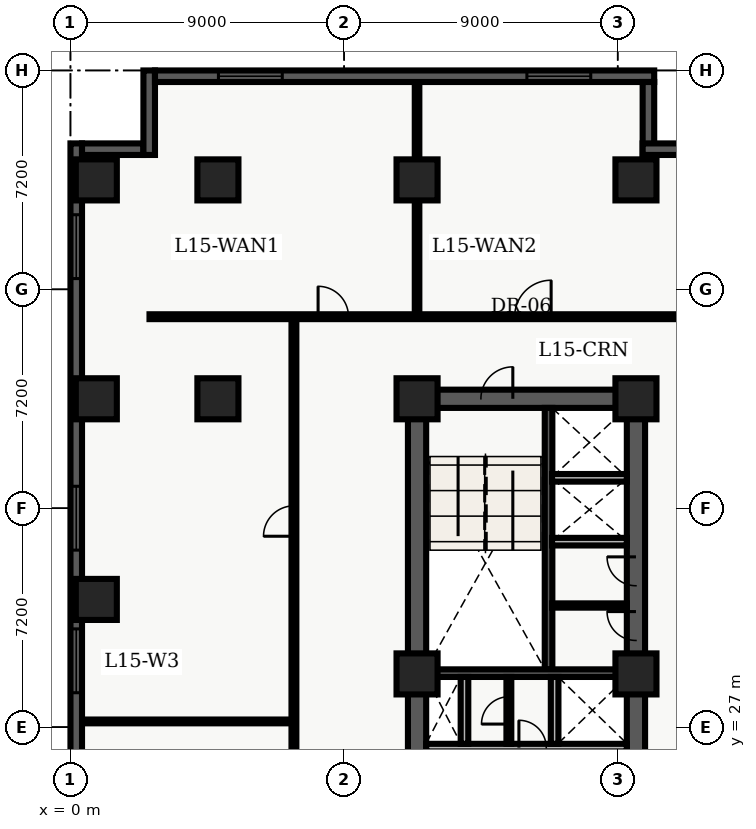
"""IFC4 building model, lengths in metres.
Left out: names, types, materials, properties, quantities, classifications, styles, units other than length and angle.
Written with IfcOpenShell. Run it as: python <this file> out.ifc"""

import sys

from ifc_helpers import new_model, entity, si_unit, converted_unit, direction, frame, origin_with_axes, origin_2d_with_axis, place, context, subcontext, project, spatial, polyline, rectangle, outline, extrude, element, fill, save


model = new_model("IFC4")
c1 = context("Model", 3, precision=1e-05, world=origin_with_axes(), true_north=direction((0.0, 1.0)))
c2 = subcontext(c1, "Body", "Model", "MODEL_VIEW")
j1 = project(units=[si_unit("LENGTHUNIT", "METRE"), converted_unit("PLANEANGLEUNIT", "DEGREE", entity("IfcPlaneAngleMeasure", 0.017), si_unit("PLANEANGLEUNIT", "RADIAN"), dimensions=[0, 0, 0, 0, 0, 0, 0])], contexts=[c1])
p1 = place(None, origin_with_axes())
s1 = spatial("IfcSite", under=j1, at=p1, CompositionType="ELEMENT")
p2 = place(p1, origin_with_axes())
s2 = spatial("IfcBuilding", under=s1, at=p2, CompositionType="ELEMENT")
p3 = place(p2, frame((0.0, 0.0, 63.9), z_axis=(0.0, 0.0, 1.0), x_axis=(1.0, 0.0, 0.0)))
s3 = spatial("IfcBuildingStorey", under=s2, at=p3, CompositionType="ELEMENT", Elevation=63.9)
p4 = place(p3, frame((11.4, 10.8, 0.0), z_axis=(0.0, 0.0, 1.0), x_axis=(0.0, 1.0, 0.0)))
e1 = element("IfcWall", 1, at=p4, inside=s3, PredefinedType="SHEAR", context=c2, shape_type="SweptSolid", body=[
    extrude(outline(polyline([(0.0, -0.3), (27.0, -0.3), (27.0, 0.3), (0.0, 0.3), (0.0, -0.3)])), origin_with_axes(), (0.0, 0.0, 1.0), 3.66),
])
p5 = place(p3, frame((11.4, 37.8, 0.0), z_axis=(0.0, 0.0, 1.0), x_axis=(1.0, 0.0, 0.0)))
e2 = element("IfcWall", 2, at=p5, inside=s3, PredefinedType="SHEAR", context=c2, shape_type="SweptSolid", body=[
    extrude(outline(polyline([(0.0, -0.3), (7.2, -0.3), (7.2, 0.3), (0.0, 0.3), (0.0, -0.3)])), origin_with_axes(), (0.0, 0.0, 1.0), 3.66),
])
p6 = place(p5, frame((2.625, 0.0, 0.0), z_axis=(0.0, 0.0, 1.0), x_axis=(1.0, 0.0, 0.0)))
e3 = element("IfcOpeningElement", 3, at=p6, cuts=e2, PredefinedType="OPENING", context=c2, shape_type="SweptSolid", body=[
    extrude(rectangle(XDim=1.05, YDim=0.62, at=origin_2d_with_axis()), origin_with_axes(), (0.0, 0.0, 1.0), 2.15),
])
p7 = place(p3, frame((18.6, 24.3, 0.0), z_axis=(0.0, 0.0, 1.0), x_axis=(0.0, 1.0, 0.0)))
e4 = element("IfcWall", 4, at=p7, inside=s3, PredefinedType="SHEAR", context=c2, shape_type="SweptSolid", body=[
    extrude(outline(polyline([(0.0, -0.3), (13.5, -0.3), (13.5, 0.3), (0.0, 0.3), (0.0, -0.3)])), origin_with_axes(), (0.0, 0.0, 1.0), 3.66),
])
p8 = place(p7, frame((6.025, 0.0, 0.0), z_axis=(0.0, 0.0, 1.0), x_axis=(1.0, 0.0, 0.0)))
e5 = element("IfcOpeningElement", 5, at=p8, cuts=e4, PredefinedType="OPENING", context=c2, shape_type="SweptSolid", body=[
    extrude(rectangle(XDim=0.95, YDim=0.62, at=origin_2d_with_axis()), origin_with_axes(), (0.0, 0.0, 1.0), 2.15),
])
p9 = place(p7, frame((7.825, 0.0, 0.0), z_axis=(0.0, 0.0, 1.0), x_axis=(1.0, 0.0, 0.0)))
e6 = element("IfcOpeningElement", 6, at=p9, cuts=e4, PredefinedType="OPENING", context=c2, shape_type="SweptSolid", body=[
    extrude(rectangle(XDim=0.95, YDim=0.62, at=origin_2d_with_axis()), origin_with_axes(), (0.0, 0.0, 1.0), 2.15),
])
p10 = place(p3, frame((15.725, 28.9, 0.0), z_axis=(0.0, 0.0, 1.0), x_axis=(0.0, 1.0, 0.0)))
e7 = element("IfcWall", 7, at=p10, inside=s3, PredefinedType="SHEAR", context=c2, shape_type="SweptSolid", body=[
    extrude(outline(polyline([(0.0, -0.125), (8.6, -0.125), (8.6, 0.125), (0.0, 0.125), (0.0, -0.125)])), origin_with_axes(), (0.0, 0.0, 1.0), 3.66),
])
p11 = place(p3, frame((11.7, 28.775, 0.0), z_axis=(0.0, 0.0, 1.0), x_axis=(1.0, 0.0, 0.0)))
e8 = element("IfcWall", 8, at=p11, inside=s3, PredefinedType="SHEAR", context=c2, shape_type="SweptSolid", body=[
    extrude(outline(polyline([(0.0, -0.125), (6.6, -0.125), (6.6, 0.125), (0.0, 0.125), (0.0, -0.125)])), origin_with_axes(), (0.0, 0.0, 1.0), 3.66),
])
p12 = place(p3, frame((11.7, 26.325, 0.0), z_axis=(0.0, 0.0, 1.0), x_axis=(1.0, 0.0, 0.0)))
e9 = element("IfcWall", 9, at=p12, inside=s3, PredefinedType="SOLIDWALL", context=c2, shape_type="SweptSolid", body=[
    extrude(outline(polyline([(0.0, -0.125), (6.6, -0.125), (6.6, 0.125), (0.0, 0.125), (0.0, -0.125)])), origin_with_axes(), (0.0, 0.0, 1.0), 2.7),
])
p13 = place(p12, frame((3.5, 0.0, 0.0), z_axis=(0.0, 0.0, 1.0), x_axis=(1.0, 0.0, 0.0)))
e10 = element("IfcOpeningElement", 10, at=p13, cuts=e9, PredefinedType="OPENING", context=c2, shape_type="SweptSolid", body=[
    extrude(rectangle(XDim=0.9, YDim=0.27, at=origin_2d_with_axis()), origin_with_axes(), (0.0, 0.0, 1.0), 2.15),
])
for number, where, z_axis, x_axis in (
    (11, (12.96, 26.45, 0.0), (0.0, 0.0, 1.0), (0.0, 1.0, 0.0)),
    (12, (15.925, 26.45, 0.0), (0.0, 0.0, 1.0), (0.0, 1.0, 0.0)),
):
    element("IfcWall", number, at=place(p3, frame(where, z_axis=z_axis, x_axis=x_axis)), inside=s3, PredefinedType="SOLIDWALL", context=c2, shape_type="SweptSolid", body=[
        extrude(outline(polyline([(0.0, -0.125), (2.2, -0.125), (2.2, 0.125), (0.0, 0.125), (0.0, -0.125)])), origin_with_axes(), (0.0, 0.0, 1.0), 2.7),
    ])
for number, where, z_axis, x_axis in (
    (13, (11.4, 28.75, 0.0), (0.0, 0.0, 1.0), (1.0, 0.0, 0.0)),
    (14, (11.4, 37.8, 0.0), (0.0, 0.0, 1.0), (1.0, 0.0, 0.0)),
    (15, (11.4, 45.0, 0.0), (0.0, 0.0, 1.0), (1.0, 0.0, 0.0)),
    (16, (18.6, 28.75, 0.0), (0.0, 0.0, 1.0), (1.0, 0.0, 0.0)),
    (17, (18.6, 37.8, 0.0), (0.0, 0.0, 1.0), (1.0, 0.0, 0.0)),
    (18, (18.6, 45.0, 0.0), (0.0, 0.0, 1.0), (1.0, 0.0, 0.0)),
    (19, (4.85, 37.8, 0.0), (0.0, 0.0, 1.0), (1.0, 0.0, 0.0)),
    (20, (4.85, 45.0, 0.0), (0.0, 0.0, 1.0), (1.0, 0.0, 0.0)),
    (21, (0.85, 31.2, 0.0), (0.0, 0.0, 1.0), (1.0, 0.0, 0.0)),
    (22, (0.85, 37.8, 0.0), (0.0, 0.0, 1.0), (1.0, 0.0, 0.0)),
    (23, (0.85, 45.0, 0.0), (0.0, 0.0, 1.0), (1.0, 0.0, 0.0)),
):
    element("IfcColumn", number, at=place(p3, frame(where, z_axis=z_axis, x_axis=x_axis)), inside=s3, PredefinedType="COLUMN", context=c2, shape_type="SweptSolid", body=[
        extrude(rectangle(XDim=1.35, YDim=1.35, at=origin_2d_with_axis()), origin_with_axes(), (0.0, 0.0, 1.0), 3.9),
    ])
p14 = place(p3, frame((14.42, 26.45, 0.0), z_axis=(0.0, 0.0, 1.0), x_axis=(0.0, 1.0, 0.0)))
e24 = element("IfcWall", 24, at=p14, inside=s3, PredefinedType="PARTITIONING", context=c2, shape_type="SweptSolid", body=[
    extrude(outline(polyline([(0.0, -0.08), (2.2, -0.08), (2.2, 0.08), (0.0, 0.08), (0.0, -0.08)])), origin_with_axes(), (0.0, 0.0, 1.0), 2.7),
])
p15 = place(p14, frame((1.1, 0.0, 0.0), z_axis=(0.0, 0.0, 1.0), x_axis=(1.0, 0.0, 0.0)))
e25 = element("IfcOpeningElement", 25, at=p15, cuts=e24, PredefinedType="OPENING", context=c2, shape_type="SweptSolid", body=[
    extrude(rectangle(XDim=0.9, YDim=0.18, at=origin_2d_with_axis()), origin_with_axes(), (0.0, 0.0, 1.0), 2.15),
])
for number, where, z_axis, x_axis in (
    (26, (15.84, 33.1, 0.0), (0.0, 0.0, 1.0), (1.0, 0.0, 0.0)),
    (27, (15.84, 35.2, 0.0), (0.0, 0.0, 1.0), (1.0, 0.0, 0.0)),
):
    element("IfcWall", number, at=place(p3, frame(where, z_axis=z_axis, x_axis=x_axis)), inside=s3, PredefinedType="SOLIDWALL", context=c2, shape_type="SweptSolid", body=[
        extrude(outline(polyline([(0.0, -0.125), (2.46, -0.125), (2.46, 0.125), (0.0, 0.125), (0.0, -0.125)])), origin_with_axes(), (0.0, 0.0, 1.0), 2.7),
    ])
p16 = place(p3, frame((15.84, 31.0, 0.0), z_axis=(0.0, 0.0, 1.0), x_axis=(1.0, 0.0, 0.0)))
e28 = element("IfcWall", 28, at=p16, inside=s3, PredefinedType="PARTITIONING", context=c2, shape_type="SweptSolid", body=[
    extrude(outline(polyline([(0.0, -0.07), (2.46, -0.07), (2.46, 0.07), (0.0, 0.07), (0.0, -0.07)])), origin_with_axes(), (0.0, 0.0, 1.0), 2.7),
])
p17 = place(p3, frame((2.6, 40.5, 0.0), z_axis=(0.0, 0.0, 1.0), x_axis=(1.0, 0.0, 0.0)))
e29 = element("IfcWall", 29, at=p17, inside=s3, PredefinedType="PARTITIONING", context=c2, shape_type="SweptSolid", body=[
    extrude(outline(polyline([(0.0, -0.08), (18.65, -0.08), (18.65, 0.08), (0.0, 0.08), (0.0, -0.08)])), origin_with_axes(), (0.0, 0.0, 1.0), 2.7),
])
p18 = place(p17, frame((6.045, 0.0, 0.0), z_axis=(0.0, 0.0, 1.0), x_axis=(1.0, 0.0, 0.0)))
e30 = element("IfcOpeningElement", 30, at=p18, cuts=e29, PredefinedType="OPENING", context=c2, shape_type="SweptSolid", body=[
    extrude(rectangle(XDim=1.0, YDim=0.18, at=origin_2d_with_axis()), origin_with_axes(), (0.0, 0.0, 1.0), 2.15),
])
p19 = place(p17, frame((12.61, 0.0, 0.0), z_axis=(0.0, 0.0, 1.0), x_axis=(1.0, 0.0, 0.0)))
e31 = element("IfcOpeningElement", 31, at=p19, cuts=e29, PredefinedType="OPENING", context=c2, shape_type="SweptSolid", body=[
    extrude(rectangle(XDim=1.2, YDim=0.18, at=origin_2d_with_axis()), origin_with_axes(), (0.0, 0.0, 1.0), 2.2),
])
p20 = place(p3, frame((7.35, 7.8, 0.0), z_axis=(0.0, 0.0, 1.0), x_axis=(0.0, 1.0, 0.0)))
e32 = element("IfcWall", 32, at=p20, inside=s3, PredefinedType="PARTITIONING", context=c2, shape_type="SweptSolid", body=[
    extrude(outline(polyline([(0.0, -0.08), (32.7, -0.08), (32.7, 0.08), (0.0, 0.08), (0.0, -0.08)])), origin_with_axes(), (0.0, 0.0, 1.0), 2.7),
])
p21 = place(p20, frame((4.379, 0.0, 0.0), z_axis=(0.0, 0.0, 1.0), x_axis=(1.0, 0.0, 0.0)))
e33 = element("IfcOpeningElement", 33, at=p21, cuts=e32, PredefinedType="OPENING", context=c2, shape_type="SweptSolid", body=[
    extrude(rectangle(XDim=1.0, YDim=0.18, at=origin_2d_with_axis()), origin_with_axes(), (0.0, 0.0, 1.0), 2.15),
])
p22 = place(p20, frame((14.008, 0.0, 0.0), z_axis=(0.0, 0.0, 1.0), x_axis=(1.0, 0.0, 0.0)))
e34 = element("IfcOpeningElement", 34, at=p22, cuts=e32, PredefinedType="OPENING", context=c2, shape_type="SweptSolid", body=[
    extrude(rectangle(XDim=1.0, YDim=0.18, at=origin_2d_with_axis()), origin_with_axes(), (0.0, 0.0, 1.0), 2.15),
])
p23 = place(p20, frame((25.979, 0.0, 0.0), z_axis=(0.0, 0.0, 1.0), x_axis=(1.0, 0.0, 0.0)))
e35 = element("IfcOpeningElement", 35, at=p23, cuts=e32, PredefinedType="OPENING", context=c2, shape_type="SweptSolid", body=[
    extrude(rectangle(XDim=1.0, YDim=0.18, at=origin_2d_with_axis()), origin_with_axes(), (0.0, 0.0, 1.0), 2.15),
])
p24 = place(p3, frame((0.375, 27.187, 0.0), z_axis=(0.0, 0.0, 1.0), x_axis=(1.0, 0.0, 0.0)))
e36 = element("IfcWall", 36, at=p24, inside=s3, PredefinedType="PARTITIONING", context=c2, shape_type="SweptSolid", body=[
    extrude(outline(polyline([(0.0, -0.062), (6.855, -0.062), (6.855, 0.062), (0.0, 0.062), (0.0, -0.062)])), origin_with_axes(), (0.0, 0.0, 1.0), 2.7),
])
p25 = place(p3, frame((11.4, 40.6, 0.0), z_axis=(0.0, 0.0, 1.0), x_axis=(0.0, 1.0, 0.0)))
e37 = element("IfcWall", 37, at=p25, inside=s3, PredefinedType="PARTITIONING", context=c2, shape_type="SweptSolid", body=[
    extrude(outline(polyline([(0.0, -0.075), (7.64, -0.075), (7.64, 0.075), (0.0, 0.075), (0.0, -0.075)])), origin_with_axes(), (0.0, 0.0, 1.0), 2.7),
])
p26 = place(p3, frame((0.19, 2.78, 0.0), z_axis=(0.0, 0.0, 1.0), x_axis=(0.0, 1.0, 0.0)))
e38 = element("IfcWall", 38, at=p26, inside=s3, PredefinedType="SOLIDWALL", context=c2, shape_type="SweptSolid", body=[
    extrude(outline(polyline([(0.0, -0.19), (43.42, -0.19), (43.42, 0.19), (0.0, 0.19), (0.0, -0.19)])), origin_with_axes(), (0.0, 0.0, 1.0), 3.66),
])
p27 = place(p26, frame((2.946, 0.0, 0.45), z_axis=(0.0, 0.0, 1.0), x_axis=(1.0, 0.0, 0.0)))
e39 = element("IfcOpeningElement", 39, at=p27, cuts=e38, PredefinedType="OPENING", context=c2, shape_type="SweptSolid", body=[
    extrude(rectangle(XDim=2.1, YDim=0.4, at=origin_2d_with_axis()), origin_with_axes(), (0.0, 0.0, 1.0), 2.2),
])
p28 = place(p26, frame((11.878, 0.0, 0.45), z_axis=(0.0, 0.0, 1.0), x_axis=(1.0, 0.0, 0.0)))
e40 = element("IfcOpeningElement", 40, at=p28, cuts=e38, PredefinedType="OPENING", context=c2, shape_type="SweptSolid", body=[
    extrude(rectangle(XDim=2.1, YDim=0.4, at=origin_2d_with_axis()), origin_with_axes(), (0.0, 0.0, 1.0), 2.2),
])
p29 = place(p26, frame((17.469, 0.0, 0.45), z_axis=(0.0, 0.0, 1.0), x_axis=(1.0, 0.0, 0.0)))
e41 = element("IfcOpeningElement", 41, at=p29, cuts=e38, PredefinedType="OPENING", context=c2, shape_type="SweptSolid", body=[
    extrude(rectangle(XDim=2.1, YDim=0.4, at=origin_2d_with_axis()), origin_with_axes(), (0.0, 0.0, 1.0), 2.2),
])
p30 = place(p26, frame((21.71, 0.0, 0.45), z_axis=(0.0, 0.0, 1.0), x_axis=(1.0, 0.0, 0.0)))
e42 = element("IfcOpeningElement", 42, at=p30, cuts=e38, PredefinedType="OPENING", context=c2, shape_type="SweptSolid", body=[
    extrude(rectangle(XDim=2.1, YDim=0.4, at=origin_2d_with_axis()), origin_with_axes(), (0.0, 0.0, 1.0), 2.2),
])
p31 = place(p26, frame((26.401, 0.0, 0.45), z_axis=(0.0, 0.0, 1.0), x_axis=(1.0, 0.0, 0.0)))
e43 = element("IfcOpeningElement", 43, at=p31, cuts=e38, PredefinedType="OPENING", context=c2, shape_type="SweptSolid", body=[
    extrude(rectangle(XDim=2.1, YDim=0.4, at=origin_2d_with_axis()), origin_with_axes(), (0.0, 0.0, 1.0), 2.2),
])
p32 = place(p26, frame((31.092, 0.0, 0.45), z_axis=(0.0, 0.0, 1.0), x_axis=(1.0, 0.0, 0.0)))
e44 = element("IfcOpeningElement", 44, at=p32, cuts=e38, PredefinedType="OPENING", context=c2, shape_type="SweptSolid", body=[
    extrude(rectangle(XDim=2.1, YDim=0.4, at=origin_2d_with_axis()), origin_with_axes(), (0.0, 0.0, 1.0), 2.2),
])
p33 = place(p26, frame((40.024, 0.0, 0.45), z_axis=(0.0, 0.0, 1.0), x_axis=(1.0, 0.0, 0.0)))
e45 = element("IfcOpeningElement", 45, at=p33, cuts=e38, PredefinedType="OPENING", context=c2, shape_type="SweptSolid", body=[
    extrude(rectangle(XDim=2.1, YDim=0.4, at=origin_2d_with_axis()), origin_with_axes(), (0.0, 0.0, 1.0), 2.2),
])
p34 = place(p3, frame((0.38, 46.01, 0.0), z_axis=(0.0, 0.0, 1.0), x_axis=(1.0, 0.0, 0.0)))
e46 = element("IfcWall", 46, at=p34, inside=s3, PredefinedType="SOLIDWALL", context=c2, shape_type="SweptSolid", body=[
    extrude(outline(polyline([(0.0, -0.19), (2.02, -0.19), (2.02, 0.19), (0.0, 0.19), (0.0, -0.19)])), origin_with_axes(), (0.0, 0.0, 1.0), 3.66),
])
p35 = place(p3, frame((2.59, 45.82, 0.0), z_axis=(0.0, 0.0, 1.0), x_axis=(0.0, 1.0, 0.0)))
e47 = element("IfcWall", 47, at=p35, inside=s3, PredefinedType="SOLIDWALL", context=c2, shape_type="SweptSolid", body=[
    extrude(outline(polyline([(0.0, -0.19), (2.78, -0.19), (2.78, 0.19), (0.0, 0.19), (0.0, -0.19)])), origin_with_axes(), (0.0, 0.0, 1.0), 3.66),
])
p36 = place(p3, frame((2.78, 48.41, 0.0), z_axis=(0.0, 0.0, 1.0), x_axis=(1.0, 0.0, 0.0)))
e48 = element("IfcWall", 48, at=p36, inside=s3, PredefinedType="SOLIDWALL", context=c2, shape_type="SweptSolid", body=[
    extrude(outline(polyline([(0.0, -0.19), (16.42, -0.19), (16.42, 0.19), (0.0, 0.19), (0.0, -0.19)])), origin_with_axes(), (0.0, 0.0, 1.0), 3.66),
])
p37 = place(p36, frame((3.137, 0.0, 0.45), z_axis=(0.0, 0.0, 1.0), x_axis=(1.0, 0.0, 0.0)))
e49 = element("IfcOpeningElement", 49, at=p37, cuts=e48, PredefinedType="OPENING", context=c2, shape_type="SweptSolid", body=[
    extrude(rectangle(XDim=2.1, YDim=0.4, at=origin_2d_with_axis()), origin_with_axes(), (0.0, 0.0, 1.0), 2.2),
])
p38 = place(p36, frame((13.283, 0.0, 0.45), z_axis=(0.0, 0.0, 1.0), x_axis=(1.0, 0.0, 0.0)))
e50 = element("IfcOpeningElement", 50, at=p38, cuts=e48, PredefinedType="OPENING", context=c2, shape_type="SweptSolid", body=[
    extrude(rectangle(XDim=2.1, YDim=0.4, at=origin_2d_with_axis()), origin_with_axes(), (0.0, 0.0, 1.0), 2.2),
])
p39 = place(p3, frame((19.01, 48.22, 0.0), z_axis=(0.0, 0.0, 1.0), x_axis=(0.0, -1.0, 0.0)))
e51 = element("IfcWall", 51, at=p39, inside=s3, PredefinedType="SOLIDWALL", context=c2, shape_type="SweptSolid", body=[
    extrude(outline(polyline([(0.0, -0.19), (2.56, -0.19), (2.56, 0.19), (0.0, 0.19), (0.0, -0.19)])), origin_with_axes(), (0.0, 0.0, 1.0), 3.66),
])
p40 = place(p3, frame((18.82, 46.01, 0.0), z_axis=(0.0, 0.0, 1.0), x_axis=(1.0, 0.0, 0.0)))
e52 = element("IfcWall", 52, at=p40, inside=s3, PredefinedType="SOLIDWALL", context=c2, shape_type="SweptSolid", body=[
    extrude(outline(polyline([(0.0, -0.19), (2.78, -0.19), (2.78, 0.19), (0.0, 0.19), (0.0, -0.19)])), origin_with_axes(), (0.0, 0.0, 1.0), 3.66),
])
p41 = place(p5, frame((2.625, 0.0, 0.0), z_axis=(0.0, 0.0, 1.0), x_axis=(1.0, 0.0, 0.0)))
e53 = element("IfcDoor", 53, at=p41, inside=s3, OperationType="SINGLE_SWING_RIGHT", PredefinedType="DOOR", context=c2, shape_type="SweptSolid", body=[
    extrude(rectangle(XDim=1.05, YDim=0.09, at=origin_2d_with_axis()), origin_with_axes(), (0.0, 0.0, 1.0), 2.15),
])
fill(e3, e53)
p42 = place(p12, frame((3.5, 0.0, 0.0), z_axis=(0.0, 0.0, 1.0), x_axis=(1.0, 0.0, 0.0)))
e54 = element("IfcDoor", 54, at=p42, inside=s3, OperationType="SINGLE_SWING_LEFT", PredefinedType="DOOR", context=c2, shape_type="SweptSolid", body=[
    extrude(rectangle(XDim=0.9, YDim=0.09, at=origin_2d_with_axis()), origin_with_axes(), (0.0, 0.0, 1.0), 2.15),
])
fill(e10, e54)
p43 = place(p14, frame((1.1, 0.0, 0.0), z_axis=(0.0, 0.0, 1.0), x_axis=(1.0, 0.0, 0.0)))
e55 = element("IfcDoor", 55, at=p43, inside=s3, OperationType="SINGLE_SWING_LEFT", PredefinedType="DOOR", context=c2, shape_type="SweptSolid", body=[
    extrude(rectangle(XDim=0.9, YDim=0.09, at=origin_2d_with_axis()), origin_with_axes(), (0.0, 0.0, 1.0), 2.15),
])
fill(e25, e55)
p44 = place(p7, frame((6.025, 0.0, 0.0), z_axis=(0.0, 0.0, 1.0), x_axis=(1.0, 0.0, 0.0)))
e56 = element("IfcDoor", 56, at=p44, inside=s3, OperationType="SINGLE_SWING_RIGHT", PredefinedType="DOOR", context=c2, shape_type="SweptSolid", body=[
    extrude(rectangle(XDim=0.95, YDim=0.09, at=origin_2d_with_axis()), origin_with_axes(), (0.0, 0.0, 1.0), 2.15),
])
fill(e5, e56)
p45 = place(p7, frame((7.825, 0.0, 0.0), z_axis=(0.0, 0.0, 1.0), x_axis=(1.0, 0.0, 0.0)))
e57 = element("IfcDoor", 57, at=p45, inside=s3, OperationType="SINGLE_SWING_RIGHT", PredefinedType="DOOR", context=c2, shape_type="SweptSolid", body=[
    extrude(rectangle(XDim=0.95, YDim=0.09, at=origin_2d_with_axis()), origin_with_axes(), (0.0, 0.0, 1.0), 2.15),
])
fill(e6, e57)
p46 = place(p20, frame((25.979, 0.0, 0.0), z_axis=(0.0, 0.0, 1.0), x_axis=(1.0, 0.0, 0.0)))
e58 = element("IfcDoor", 58, at=p46, inside=s3, OperationType="SINGLE_SWING_LEFT", PredefinedType="DOOR", context=c2, shape_type="SweptSolid", body=[
    extrude(rectangle(XDim=1.0, YDim=0.09, at=origin_2d_with_axis()), origin_with_axes(), (0.0, 0.0, 1.0), 2.15),
])
fill(e35, e58)
p47 = place(p17, frame((6.045, 0.0, 0.0), z_axis=(0.0, 0.0, 1.0), x_axis=(1.0, 0.0, 0.0)))
e59 = element("IfcDoor", 59, at=p47, inside=s3, OperationType="SINGLE_SWING_LEFT", PredefinedType="DOOR", context=c2, shape_type="SweptSolid", body=[
    extrude(rectangle(XDim=1.0, YDim=0.09, at=origin_2d_with_axis()), origin_with_axes(), (0.0, 0.0, 1.0), 2.15),
])
fill(e30, e59)
p48 = place(p17, frame((12.61, 0.0, 0.0), z_axis=(0.0, 0.0, 1.0), x_axis=(1.0, 0.0, 0.0)))
e60 = element("IfcDoor", 60, at=p48, inside=s3, OperationType="SINGLE_SWING_RIGHT", PredefinedType="DOOR", context=c2, shape_type="SweptSolid", body=[
    extrude(rectangle(XDim=1.2, YDim=0.09, at=origin_2d_with_axis()), origin_with_axes(), (0.0, 0.0, 1.0), 2.2),
])
fill(e31, e60)
p49 = place(p26, frame((26.401, 0.0, 0.45), z_axis=(0.0, 0.0, 1.0), x_axis=(1.0, 0.0, 0.0)))
e61 = element("IfcWindow", 61, at=p49, inside=s3, PredefinedType="WINDOW", context=c2, shape_type="SweptSolid", body=[
    extrude(rectangle(XDim=2.1, YDim=0.09, at=origin_2d_with_axis()), origin_with_axes(), (0.0, 0.0, 1.0), 2.2),
])
fill(e43, e61)
p50 = place(p26, frame((31.092, 0.0, 0.45), z_axis=(0.0, 0.0, 1.0), x_axis=(1.0, 0.0, 0.0)))
e62 = element("IfcWindow", 62, at=p50, inside=s3, PredefinedType="WINDOW", context=c2, shape_type="SweptSolid", body=[
    extrude(rectangle(XDim=2.1, YDim=0.09, at=origin_2d_with_axis()), origin_with_axes(), (0.0, 0.0, 1.0), 2.2),
])
fill(e44, e62)
p51 = place(p26, frame((40.024, 0.0, 0.45), z_axis=(0.0, 0.0, 1.0), x_axis=(1.0, 0.0, 0.0)))
e63 = element("IfcWindow", 63, at=p51, inside=s3, PredefinedType="WINDOW", context=c2, shape_type="SweptSolid", body=[
    extrude(rectangle(XDim=2.1, YDim=0.09, at=origin_2d_with_axis()), origin_with_axes(), (0.0, 0.0, 1.0), 2.2),
])
fill(e45, e63)
p52 = place(p36, frame((3.137, 0.0, 0.45), z_axis=(0.0, 0.0, 1.0), x_axis=(1.0, 0.0, 0.0)))
e64 = element("IfcWindow", 64, at=p52, inside=s3, PredefinedType="WINDOW", context=c2, shape_type="SweptSolid", body=[
    extrude(rectangle(XDim=2.1, YDim=0.09, at=origin_2d_with_axis()), origin_with_axes(), (0.0, 0.0, 1.0), 2.2),
])
fill(e49, e64)
p53 = place(p36, frame((13.283, 0.0, 0.45), z_axis=(0.0, 0.0, 1.0), x_axis=(1.0, 0.0, 0.0)))
e65 = element("IfcWindow", 65, at=p53, inside=s3, PredefinedType="WINDOW", context=c2, shape_type="SweptSolid", body=[
    extrude(rectangle(XDim=2.1, YDim=0.09, at=origin_2d_with_axis()), origin_with_axes(), (0.0, 0.0, 1.0), 2.2),
])
fill(e50, e65)
save(model, sys.argv[1])
